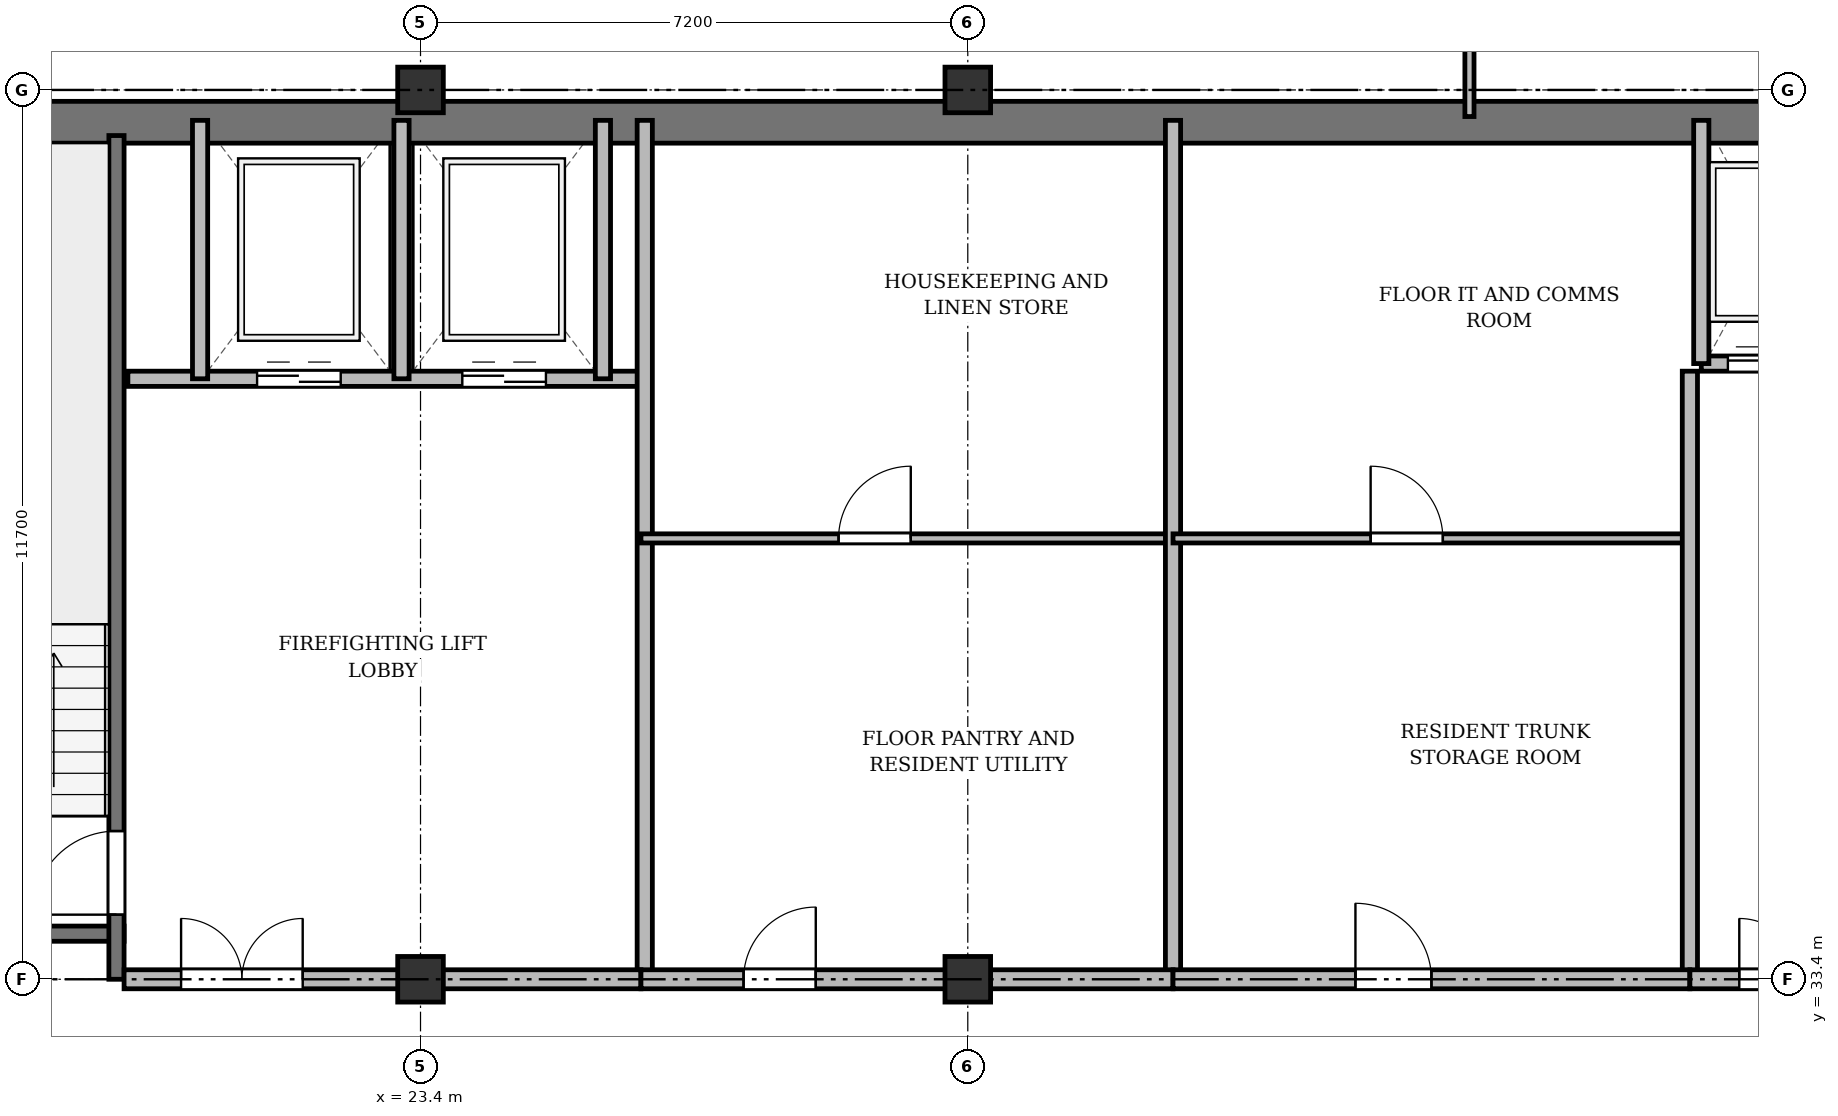
"""IFC4 building model, lengths in metres.
Left out: names, types, materials, properties, quantities, classifications, styles, units other than length and angle.
Written with IfcOpenShell. Run it as: python <this file> out.ifc"""

import sys

from ifc_helpers import new_model, si_unit, direction, frame, frame_2d, origin, origin_2d, place, context, subcontext, project, spatial, rectangle, extrude, source, transform, mapped, element, fill, save


model = new_model("IFC4")
c1 = context("Model", 3, precision=1e-05, world=origin(), true_north=direction((0.0, 1.0)))
c2 = subcontext(c1, "Body", "Model", "MODEL_VIEW")
j1 = project(units=[si_unit("LENGTHUNIT", "METRE"), si_unit("PLANEANGLEUNIT", "RADIAN")], contexts=[c1])
p1 = place(None, origin())
s1 = spatial("IfcSite", under=j1, at=p1, CompositionType="ELEMENT")
p2 = place(p1, origin())
s2 = spatial("IfcBuilding", under=s1, at=p2, CompositionType="ELEMENT")
p3 = place(p2, frame((0.0, 0.0, 259.5)))
s3 = spatial("IfcBuildingStorey", under=s2, at=p3, CompositionType="ELEMENT", Elevation=259.5)
m1 = source(origin(), c2, "Body", "SweptSolid", [
    extrude(rectangle(XDim=0.6, YDim=0.6, at=origin_2d()), origin(), (0.0, 0.0, 1.0), 3.6),
])
for number, where, z_axis, x_axis in (
    (1, (23.4, 33.4, 0.0), (0.0, 0.0, 1.0), (1.0, 0.0, 0.0)),
    (2, (23.4, 45.1, 0.0), (0.0, 0.0, 1.0), (1.0, 0.0, 0.0)),
    (3, (30.6, 33.4, 0.0), (0.0, 0.0, 1.0), (1.0, 0.0, 0.0)),
    (4, (30.6, 45.1, 0.0), (0.0, 0.0, 1.0), (1.0, 0.0, 0.0)),
):
    element("IfcColumn", number, at=place(p3, frame(where, z_axis=z_axis, x_axis=x_axis)), inside=s3, PredefinedType="COLUMN", context=c2, shape_type="MappedRepresentation", body=[
        mapped(m1, transform((0.0, 0.0, 0.0), x_axis=(1.0, 0.0, 0.0), y_axis=(0.0, 1.0, 0.0), z_axis=(0.0, 0.0, 1.0), scale=1.0)),
    ])
p4 = place(p3, frame((15.65, 44.675, 0.0), z_axis=(0.0, 0.0, 1.0), x_axis=(1.0, 0.0, 0.0)))
e5 = element("IfcWall", 5, at=p4, inside=s3, PredefinedType="SHEAR", context=c2, shape_type="SweptSolid", body=[
    extrude(rectangle(XDim=43.1, YDim=0.55, at=frame_2d((21.55, 0.0))), origin(), (0.0, 0.0, 1.0), 3.37),
])
p5 = place(p3, frame((16.1, 34.0, 0.0), z_axis=(0.0, 0.0, 1.0), x_axis=(1.0, 0.0, 0.0)))
e6 = element("IfcWall", 6, at=p5, inside=s3, PredefinedType="SHEAR", context=c2, shape_type="SweptSolid", body=[
    extrude(rectangle(XDim=3.4, YDim=0.2, at=frame_2d((1.7, 0.0))), origin(), (0.0, 0.0, 1.0), 3.37),
])
p6 = place(p3, frame((19.4, 33.4, 0.0), z_axis=(0.0, 0.0, 1.0), x_axis=(0.0, 1.0, 0.0)))
e7 = element("IfcWall", 7, at=p6, inside=s3, PredefinedType="SHEAR", context=c2, shape_type="SweptSolid", body=[
    extrude(rectangle(XDim=11.1, YDim=0.2, at=frame_2d((5.55, 0.0))), origin(), (0.0, 0.0, 1.0), 3.37),
])
p7 = place(p6, frame((0.85, 0.0, 0.0)))
e8 = element("IfcOpeningElement", 8, at=p7, cuts=e7, PredefinedType="OPENING", context=c2, shape_type="SweptSolid", body=[
    extrude(rectangle(XDim=1.1, YDim=2.15, at=frame_2d((0.55, 1.075))), frame((0.0, 0.11, 0.0), z_axis=(0.0, -1.0, 0.0), x_axis=(1.0, 0.0, 0.0)), (0.0, 0.0, 1.0), 0.22),
])
p8 = place(p3, frame((19.55, 41.3, 0.0), z_axis=(0.0, 0.0, 1.0), x_axis=(1.0, 0.0, 0.0)))
e9 = element("IfcWall", 9, at=p8, inside=s3, PredefinedType="SOLIDWALL", context=c2, shape_type="SweptSolid", body=[
    extrude(rectangle(XDim=6.75, YDim=0.2, at=frame_2d((3.375, 0.0))), origin(), (0.0, 0.0, 1.0), 3.37),
])
p9 = place(p8, frame((1.7, 0.0, 0.0)))
e10 = element("IfcOpeningElement", 10, at=p9, cuts=e9, PredefinedType="OPENING", context=c2, shape_type="SweptSolid", body=[
    extrude(rectangle(XDim=1.1, YDim=2.15, at=frame_2d((0.55, 1.075))), frame((0.0, 0.11, 0.0), z_axis=(0.0, -1.0, 0.0), x_axis=(1.0, 0.0, 0.0)), (0.0, 0.0, 1.0), 0.22),
])
p10 = place(p8, frame((4.4, 0.0, 0.0)))
e11 = element("IfcOpeningElement", 11, at=p10, cuts=e9, PredefinedType="OPENING", context=c2, shape_type="SweptSolid", body=[
    extrude(rectangle(XDim=1.1, YDim=2.15, at=frame_2d((0.55, 1.075))), frame((0.0, 0.11, 0.0), z_axis=(0.0, -1.0, 0.0), x_axis=(1.0, 0.0, 0.0)), (0.0, 0.0, 1.0), 0.22),
])
for number, where, z_axis, x_axis in (
    (12, (20.5, 41.3, 0.0), (0.0, 0.0, 1.0), (0.0, 1.0, 0.0)),
    (13, (23.15, 41.3, 0.0), (0.0, 0.0, 1.0), (0.0, 1.0, 0.0)),
    (14, (25.8, 41.3, 0.0), (0.0, 0.0, 1.0), (0.0, 1.0, 0.0)),
):
    element("IfcWall", number, at=place(p3, frame(where, z_axis=z_axis, x_axis=x_axis)), inside=s3, PredefinedType="SOLIDWALL", context=c2, shape_type="SweptSolid", body=[
        extrude(rectangle(XDim=3.4, YDim=0.2, at=frame_2d((1.7, 0.0))), origin(), (0.0, 0.0, 1.0), 3.37),
    ])
p11 = place(p3, frame((26.35, 33.4, 0.0), z_axis=(0.0, 0.0, 1.0), x_axis=(0.0, 1.0, 0.0)))
e15 = element("IfcWall", 15, at=p11, inside=s3, PredefinedType="SOLIDWALL", context=c2, shape_type="SweptSolid", body=[
    extrude(rectangle(XDim=11.3, YDim=0.2, at=frame_2d((5.65, 0.0))), origin(), (0.0, 0.0, 1.0), 2.92),
])
p12 = place(p3, frame((19.5, 33.4, 0.0), z_axis=(0.0, 0.0, 1.0), x_axis=(1.0, 0.0, 0.0)))
e16 = element("IfcWall", 16, at=p12, inside=s3, PredefinedType="PARTITIONING", context=c2, shape_type="SweptSolid", body=[
    extrude(rectangle(XDim=6.8, YDim=0.25, at=frame_2d((3.4, 0.0))), origin(), (0.0, 0.0, 1.0), 2.92),
])
p13 = place(p12, frame((0.75, 0.0, 0.0)))
e17 = element("IfcOpeningElement", 17, at=p13, cuts=e16, PredefinedType="OPENING", context=c2, shape_type="SweptSolid", body=[
    extrude(rectangle(XDim=1.6, YDim=2.2, at=frame_2d((0.8, 1.1))), frame((0.0, 0.135, 0.0), z_axis=(0.0, -1.0, 0.0), x_axis=(1.0, 0.0, 0.0)), (0.0, 0.0, 1.0), 0.27),
])
p14 = place(p3, frame((26.3, 39.2, 0.0), z_axis=(0.0, 0.0, 1.0), x_axis=(1.0, 0.0, 0.0)))
e18 = element("IfcWall", 18, at=p14, inside=s3, PredefinedType="PARTITIONING", context=c2, shape_type="SweptSolid", body=[
    extrude(rectangle(XDim=7.0, YDim=0.12, at=frame_2d((3.5, 0.0))), origin(), (0.0, 0.0, 1.0), 2.87),
])
p15 = place(p14, frame((2.6, 0.0, 0.0)))
e19 = element("IfcOpeningElement", 19, at=p15, cuts=e18, PredefinedType="OPENING", context=c2, shape_type="SweptSolid", body=[
    extrude(rectangle(XDim=0.95, YDim=2.15, at=frame_2d((0.475, 1.075))), frame((0.0, 0.07, 0.0), z_axis=(0.0, -1.0, 0.0), x_axis=(1.0, 0.0, 0.0)), (0.0, 0.0, 1.0), 0.14),
])
p16 = place(p3, frame((33.3, 33.4, 0.0), z_axis=(0.0, 0.0, 1.0), x_axis=(0.0, 1.0, 0.0)))
e20 = element("IfcWall", 20, at=p16, inside=s3, PredefinedType="SOLIDWALL", context=c2, shape_type="SweptSolid", body=[
    extrude(rectangle(XDim=11.3, YDim=0.2, at=frame_2d((5.65, 0.0))), origin(), (0.0, 0.0, 1.0), 2.92),
])
p17 = place(p3, frame((33.3, 39.2, 0.0), z_axis=(0.0, 0.0, 1.0), x_axis=(1.0, 0.0, 0.0)))
e21 = element("IfcWall", 21, at=p17, inside=s3, PredefinedType="PARTITIONING", context=c2, shape_type="SweptSolid", body=[
    extrude(rectangle(XDim=6.8, YDim=0.12, at=frame_2d((3.4, 0.0))), origin(), (0.0, 0.0, 1.0), 3.37),
])
p18 = place(p17, frame((2.6, 0.0, 0.0)))
e22 = element("IfcOpeningElement", 22, at=p18, cuts=e21, PredefinedType="OPENING", context=c2, shape_type="SweptSolid", body=[
    extrude(rectangle(XDim=0.95, YDim=2.15, at=frame_2d((0.475, 1.075))), frame((0.0, 0.07, 0.0), z_axis=(0.0, -1.0, 0.0), x_axis=(1.0, 0.0, 0.0)), (0.0, 0.0, 1.0), 0.14),
])
p19 = place(p3, frame((40.1, 33.4, 0.0), z_axis=(0.0, 0.0, 1.0), x_axis=(0.0, 1.0, 0.0)))
e23 = element("IfcWall", 23, at=p19, inside=s3, PredefinedType="SOLIDWALL", context=c2, shape_type="SweptSolid", body=[
    extrude(rectangle(XDim=8.0, YDim=0.2, at=frame_2d((4.0, 0.0))), origin(), (0.0, 0.0, 1.0), 2.92),
])
p20 = place(p3, frame((40.25, 41.5, 0.0), z_axis=(0.0, 0.0, 1.0), x_axis=(1.0, 0.0, 0.0)))
e24 = element("IfcWall", 24, at=p20, inside=s3, PredefinedType="SOLIDWALL", context=c2, shape_type="SweptSolid", body=[
    extrude(rectangle(XDim=6.9, YDim=0.2, at=frame_2d((3.45, 0.0))), origin(), (0.0, 0.0, 1.0), 3.37),
])
p21 = place(p20, frame((0.35, 0.0, 0.0)))
e25 = element("IfcOpeningElement", 25, at=p21, cuts=e24, PredefinedType="OPENING", context=c2, shape_type="SweptSolid", body=[
    extrude(rectangle(XDim=1.05, YDim=2.15, at=frame_2d((0.525, 1.075))), frame((0.0, 0.11, 0.0), z_axis=(0.0, -1.0, 0.0), x_axis=(1.0, 0.0, 0.0)), (0.0, 0.0, 1.0), 0.22),
])
p22 = place(p20, frame((2.05, 0.0, 0.0)))
e26 = element("IfcOpeningElement", 26, at=p22, cuts=e24, PredefinedType="OPENING", context=c2, shape_type="SweptSolid", body=[
    extrude(rectangle(XDim=1.05, YDim=2.15, at=frame_2d((0.525, 1.075))), frame((0.0, 0.11, 0.0), z_axis=(0.0, -1.0, 0.0), x_axis=(1.0, 0.0, 0.0)), (0.0, 0.0, 1.0), 0.22),
])
p23 = place(p20, frame((3.75, 0.0, 0.0)))
e27 = element("IfcOpeningElement", 27, at=p23, cuts=e24, PredefinedType="OPENING", context=c2, shape_type="SweptSolid", body=[
    extrude(rectangle(XDim=1.05, YDim=2.15, at=frame_2d((0.525, 1.075))), frame((0.0, 0.11, 0.0), z_axis=(0.0, -1.0, 0.0), x_axis=(1.0, 0.0, 0.0)), (0.0, 0.0, 1.0), 0.22),
])
p24 = place(p20, frame((5.45, 0.0, 0.0)))
e28 = element("IfcOpeningElement", 28, at=p24, cuts=e24, PredefinedType="OPENING", context=c2, shape_type="SweptSolid", body=[
    extrude(rectangle(XDim=1.05, YDim=2.15, at=frame_2d((0.525, 1.075))), frame((0.0, 0.11, 0.0), z_axis=(0.0, -1.0, 0.0), x_axis=(1.0, 0.0, 0.0)), (0.0, 0.0, 1.0), 0.22),
])
p25 = place(p3, frame((40.25, 41.5, 0.0), z_axis=(0.0, 0.0, 1.0), x_axis=(0.0, 1.0, 0.0)))
e29 = element("IfcWall", 29, at=p25, inside=s3, PredefinedType="SOLIDWALL", context=c2, shape_type="SweptSolid", body=[
    extrude(rectangle(XDim=3.2, YDim=0.2, at=frame_2d((1.6, 0.0))), origin(), (0.0, 0.0, 1.0), 3.37),
])
p26 = place(p3, frame((26.3, 33.4, 0.0), z_axis=(0.0, 0.0, 1.0), x_axis=(1.0, 0.0, 0.0)))
e30 = element("IfcWall", 30, at=p26, inside=s3, PredefinedType="PARTITIONING", context=c2, shape_type="SweptSolid", body=[
    extrude(rectangle(XDim=7.0, YDim=0.25, at=frame_2d((3.5, 0.0))), origin(), (0.0, 0.0, 1.0), 2.92),
])
p27 = place(p26, frame((1.35, 0.0, 0.0)))
e31 = element("IfcOpeningElement", 31, at=p27, cuts=e30, PredefinedType="OPENING", context=c2, shape_type="SweptSolid", body=[
    extrude(rectangle(XDim=0.95, YDim=2.15, at=frame_2d((0.475, 1.075))), frame((0.0, 0.135, 0.0), z_axis=(0.0, -1.0, 0.0), x_axis=(1.0, 0.0, 0.0)), (0.0, 0.0, 1.0), 0.27),
])
p28 = place(p3, frame((33.3, 33.4, 0.0), z_axis=(0.0, 0.0, 1.0), x_axis=(1.0, 0.0, 0.0)))
e32 = element("IfcWall", 32, at=p28, inside=s3, PredefinedType="PARTITIONING", context=c2, shape_type="SweptSolid", body=[
    extrude(rectangle(XDim=6.8, YDim=0.25, at=frame_2d((3.4, 0.0))), origin(), (0.0, 0.0, 1.0), 2.92),
])
p29 = place(p28, frame((2.4, 0.0, 0.0)))
e33 = element("IfcOpeningElement", 33, at=p29, cuts=e32, PredefinedType="OPENING", context=c2, shape_type="SweptSolid", body=[
    extrude(rectangle(XDim=1.0, YDim=2.15, at=frame_2d((0.5, 1.075))), frame((0.0, 0.135, 0.0), z_axis=(0.0, -1.0, 0.0), x_axis=(1.0, 0.0, 0.0)), (0.0, 0.0, 1.0), 0.27),
])
p30 = place(p3, frame((40.1, 33.4, 0.0), z_axis=(0.0, 0.0, 1.0), x_axis=(1.0, 0.0, 0.0)))
e34 = element("IfcWall", 34, at=p30, inside=s3, PredefinedType="PARTITIONING", context=c2, shape_type="SweptSolid", body=[
    extrude(rectangle(XDim=7.05, YDim=0.25, at=frame_2d((3.525, 0.0))), origin(), (0.0, 0.0, 1.0), 2.92),
])
p31 = place(p30, frame((0.65, 0.0, 0.0)))
e35 = element("IfcOpeningElement", 35, at=p31, cuts=e34, PredefinedType="OPENING", context=c2, shape_type="SweptSolid", body=[
    extrude(rectangle(XDim=1.6, YDim=2.2, at=frame_2d((0.8, 1.1))), frame((0.0, 0.135, 0.0), z_axis=(0.0, -1.0, 0.0), x_axis=(1.0, 0.0, 0.0)), (0.0, 0.0, 1.0), 0.27),
])
p32 = place(p3, frame((37.2, 44.75, 0.0), z_axis=(0.0, 0.0, 1.0), x_axis=(0.0, 1.0, 0.0)))
e36 = element("IfcWall", 36, at=p32, inside=s3, PredefinedType="PARTITIONING", context=c2, shape_type="SweptSolid", body=[
    extrude(rectangle(XDim=3.61, YDim=0.12, at=frame_2d((1.805, 0.0))), origin(), (0.0, 0.0, 1.0), 2.92),
])
p33 = place(p32, frame((1.1, 0.0, 0.0)))
e37 = element("IfcOpeningElement", 37, at=p33, cuts=e36, PredefinedType="OPENING", context=c2, shape_type="SweptSolid", body=[
    extrude(rectangle(XDim=0.95, YDim=2.15, at=frame_2d((0.475, 1.075))), frame((0.0, 0.07, 0.0), z_axis=(0.0, -1.0, 0.0), x_axis=(1.0, 0.0, 0.0)), (0.0, 0.0, 1.0), 0.14),
])
m2 = source(origin(), c2, "Body", "SweptSolid", [
    extrude(rectangle(XDim=1.1, YDim=2.15, at=frame_2d((0.55, 1.075))), frame((0.0, 0.025, 0.0), z_axis=(0.0, -1.0, 0.0), x_axis=(1.0, 0.0, 0.0)), (0.0, 0.0, 1.0), 0.05),
])
p34 = place(p7, origin())
e38 = element("IfcDoor", 38, at=p34, inside=s3, OperationType="SINGLE_SWING_LEFT", PredefinedType="DOOR", context=c2, shape_type="MappedRepresentation", body=[
    mapped(m2, transform((0.0, 0.0, 0.0), x_axis=(1.0, 0.0, 0.0), y_axis=(0.0, 1.0, 0.0), z_axis=(0.0, 0.0, 1.0), scale=1.0)),
])
fill(e8, e38)
p35 = place(p9, origin())
e39 = element("IfcDoor", 39, at=p35, inside=s3, OperationType="DOUBLE_DOOR_SLIDING", PredefinedType="DOOR", context=c2, shape_type="MappedRepresentation", body=[
    mapped(m2, transform((0.0, 0.0, 0.0), x_axis=(1.0, 0.0, 0.0), y_axis=(0.0, 1.0, 0.0), z_axis=(0.0, 0.0, 1.0), scale=1.0)),
])
fill(e10, e39)
p36 = place(p10, origin())
e40 = element("IfcDoor", 40, at=p36, inside=s3, OperationType="DOUBLE_DOOR_SLIDING", PredefinedType="DOOR", context=c2, shape_type="MappedRepresentation", body=[
    mapped(m2, transform((0.0, 0.0, 0.0), x_axis=(1.0, 0.0, 0.0), y_axis=(0.0, 1.0, 0.0), z_axis=(0.0, 0.0, 1.0), scale=1.0)),
])
fill(e11, e40)
m3 = source(origin(), c2, "Body", "SweptSolid", [
    extrude(rectangle(XDim=1.6, YDim=2.2, at=frame_2d((0.8, 1.1))), frame((0.0, 0.025, 0.0), z_axis=(0.0, -1.0, 0.0), x_axis=(1.0, 0.0, 0.0)), (0.0, 0.0, 1.0), 0.05),
])
p37 = place(p13, origin())
e41 = element("IfcDoor", 41, at=p37, inside=s3, OperationType="DOUBLE_DOOR_SINGLE_SWING", PredefinedType="DOOR", context=c2, shape_type="MappedRepresentation", body=[
    mapped(m3, transform((0.0, 0.0, 0.0), x_axis=(1.0, 0.0, 0.0), y_axis=(0.0, 1.0, 0.0), z_axis=(0.0, 0.0, 1.0), scale=1.0)),
])
fill(e17, e41)
m4 = source(origin(), c2, "Body", "SweptSolid", [
    extrude(rectangle(XDim=0.95, YDim=2.15, at=frame_2d((0.475, 1.075))), frame((0.0, 0.025, 0.0), z_axis=(0.0, -1.0, 0.0), x_axis=(1.0, 0.0, 0.0)), (0.0, 0.0, 1.0), 0.05),
])
p38 = place(p15, origin())
e42 = element("IfcDoor", 42, at=p38, inside=s3, OperationType="SINGLE_SWING_RIGHT", PredefinedType="DOOR", context=c2, shape_type="MappedRepresentation", body=[
    mapped(m4, transform((0.0, 0.0, 0.0), x_axis=(1.0, 0.0, 0.0), y_axis=(0.0, 1.0, 0.0), z_axis=(0.0, 0.0, 1.0), scale=1.0)),
])
fill(e19, e42)
p39 = place(p18, origin())
e43 = element("IfcDoor", 43, at=p39, inside=s3, OperationType="SINGLE_SWING_LEFT", PredefinedType="DOOR", context=c2, shape_type="MappedRepresentation", body=[
    mapped(m4, transform((0.0, 0.0, 0.0), x_axis=(1.0, 0.0, 0.0), y_axis=(0.0, 1.0, 0.0), z_axis=(0.0, 0.0, 1.0), scale=1.0)),
])
fill(e22, e43)
m5 = source(origin(), c2, "Body", "SweptSolid", [
    extrude(rectangle(XDim=1.05, YDim=2.15, at=frame_2d((0.525, 1.075))), frame((0.0, 0.025, 0.0), z_axis=(0.0, -1.0, 0.0), x_axis=(1.0, 0.0, 0.0)), (0.0, 0.0, 1.0), 0.05),
])
p40 = place(p21, origin())
e44 = element("IfcDoor", 44, at=p40, inside=s3, OperationType="DOUBLE_DOOR_SLIDING", PredefinedType="DOOR", context=c2, shape_type="MappedRepresentation", body=[
    mapped(m5, transform((0.0, 0.0, 0.0), x_axis=(1.0, 0.0, 0.0), y_axis=(0.0, 1.0, 0.0), z_axis=(0.0, 0.0, 1.0), scale=1.0)),
])
fill(e25, e44)
p41 = place(p27, origin())
e45 = element("IfcDoor", 45, at=p41, inside=s3, OperationType="SINGLE_SWING_RIGHT", PredefinedType="DOOR", context=c2, shape_type="MappedRepresentation", body=[
    mapped(m4, transform((0.0, 0.0, 0.0), x_axis=(1.0, 0.0, 0.0), y_axis=(0.0, 1.0, 0.0), z_axis=(0.0, 0.0, 1.0), scale=1.0)),
])
fill(e31, e45)
m6 = source(origin(), c2, "Body", "SweptSolid", [
    extrude(rectangle(XDim=1.0, YDim=2.15, at=frame_2d((0.5, 1.075))), frame((0.0, 0.025, 0.0), z_axis=(0.0, -1.0, 0.0), x_axis=(1.0, 0.0, 0.0)), (0.0, 0.0, 1.0), 0.05),
])
p42 = place(p29, origin())
e46 = element("IfcDoor", 46, at=p42, inside=s3, OperationType="SINGLE_SWING_LEFT", PredefinedType="DOOR", context=c2, shape_type="MappedRepresentation", body=[
    mapped(m6, transform((0.0, 0.0, 0.0), x_axis=(1.0, 0.0, 0.0), y_axis=(0.0, 1.0, 0.0), z_axis=(0.0, 0.0, 1.0), scale=1.0)),
])
fill(e33, e46)
p43 = place(p31, origin())
e47 = element("IfcDoor", 47, at=p43, inside=s3, OperationType="DOUBLE_DOOR_SINGLE_SWING", PredefinedType="DOOR", context=c2, shape_type="MappedRepresentation", body=[
    mapped(m3, transform((0.0, 0.0, 0.0), x_axis=(1.0, 0.0, 0.0), y_axis=(0.0, 1.0, 0.0), z_axis=(0.0, 0.0, 1.0), scale=1.0)),
])
fill(e35, e47)
save(model, sys.argv[1])
